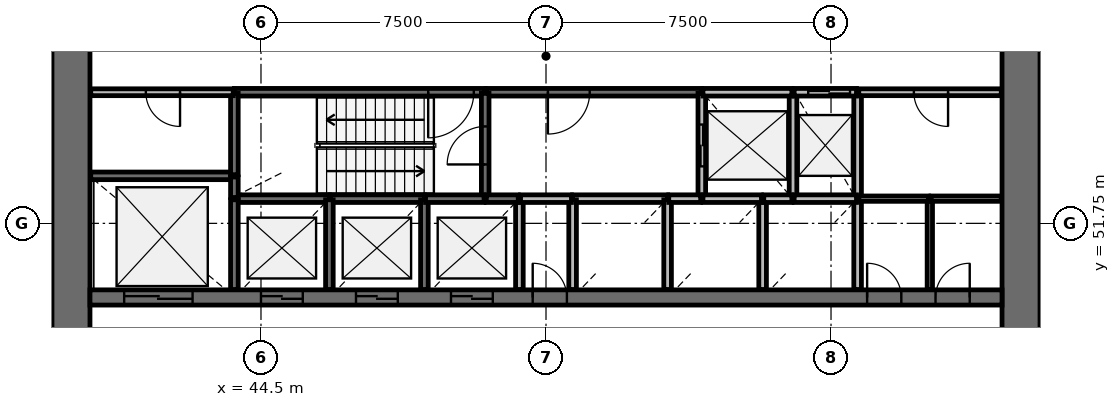
"""IFC4 building model, lengths in metres.
Left out: names, types, materials, properties, quantities, classifications, styles, units other than length and angle.
Written with IfcOpenShell. Run it as: python <this file> out.ifc"""

import sys

from ifc_helpers import new_model, si_unit, direction, frame, frame_2d, origin, place, context, subcontext, project, spatial, rectangle, extrude, source, transform, mapped, element, fill, save


model = new_model("IFC4")
c1 = context("Model", 3, precision=1e-05, world=origin(), true_north=direction((0.0, 1.0)))
c2 = subcontext(c1, "Body", "Model", "MODEL_VIEW")
j1 = project(units=[si_unit("LENGTHUNIT", "METRE"), si_unit("PLANEANGLEUNIT", "RADIAN")], contexts=[c1])
p1 = place(None, origin())
s1 = spatial("IfcSite", under=j1, at=p1, CompositionType="ELEMENT")
p2 = place(p1, origin())
s2 = spatial("IfcBuilding", under=s1, at=p2, CompositionType="ELEMENT")
p3 = place(p2, frame((0.0, 0.0, 62.2)))
s3 = spatial("IfcBuildingStorey", under=s2, at=p3, CompositionType="ELEMENT", Elevation=62.2)
p4 = place(p3, frame((64.5, 38.0, 0.0), z_axis=(0.0, 0.0, 1.0), x_axis=(0.0, 1.0, 0.0)))
e1 = element("IfcWall", 1, at=p4, inside=s3, PredefinedType="SHEAR", context=c2, shape_type="SweptSolid", body=[
    extrude(rectangle(XDim=20.0, YDim=1.0, at=frame_2d((10.0, 0.0))), origin(), (0.0, 0.0, 1.0), 4.4),
])
p5 = place(p4, frame((9.1, 0.0, 0.0)))
e2 = element("IfcOpeningElement", 2, at=p5, cuts=e1, PredefinedType="OPENING", context=c2, shape_type="SweptSolid", body=[
    extrude(rectangle(XDim=1.8, YDim=2.1, at=frame_2d((0.9, 1.05))), frame((0.0, 0.51, 0.0), z_axis=(0.0, -1.0, 0.0), x_axis=(1.0, 0.0, 0.0)), (0.0, 0.0, 1.0), 1.02),
])
p6 = place(p3, frame((39.5, 58.0, 0.0), z_axis=(0.0, 0.0, 1.0), x_axis=(0.0, -1.0, 0.0)))
e3 = element("IfcWall", 3, at=p6, inside=s3, PredefinedType="SHEAR", context=c2, shape_type="SweptSolid", body=[
    extrude(rectangle(XDim=20.0, YDim=1.0, at=frame_2d((10.0, 0.0))), origin(), (0.0, 0.0, 1.0), 4.4),
])
p7 = place(p6, frame((9.1, 0.0, 0.0)))
e4 = element("IfcOpeningElement", 4, at=p7, cuts=e3, PredefinedType="OPENING", context=c2, shape_type="SweptSolid", body=[
    extrude(rectangle(XDim=1.8, YDim=2.1, at=frame_2d((0.9, 1.05))), frame((0.0, 0.51, 0.0), z_axis=(0.0, -1.0, 0.0), x_axis=(1.0, 0.0, 0.0)), (0.0, 0.0, 1.0), 1.02),
])
p8 = place(p3, frame((40.0, 49.8, 0.0), z_axis=(0.0, 0.0, 1.0), x_axis=(1.0, 0.0, 0.0)))
e5 = element("IfcWall", 5, at=p8, inside=s3, PredefinedType="SHEAR", context=c2, shape_type="SweptSolid", body=[
    extrude(rectangle(XDim=24.0, YDim=0.4, at=frame_2d((12.0, 0.0))), origin(), (0.0, 0.0, 1.0), 4.4),
])
p9 = place(p8, frame((4.5, 0.0, 0.0)))
e6 = element("IfcOpeningElement", 6, at=p9, cuts=e5, PredefinedType="OPENING", context=c2, shape_type="SweptSolid", body=[
    extrude(rectangle(XDim=1.1, YDim=2.1, at=frame_2d((0.55, 1.05))), frame((0.0, 0.21, 0.0), z_axis=(0.0, -1.0, 0.0), x_axis=(1.0, 0.0, 0.0)), (0.0, 0.0, 1.0), 0.42),
])
p10 = place(p8, frame((7.0, 0.0, 0.0)))
e7 = element("IfcOpeningElement", 7, at=p10, cuts=e5, PredefinedType="OPENING", context=c2, shape_type="SweptSolid", body=[
    extrude(rectangle(XDim=1.1, YDim=2.1, at=frame_2d((0.55, 1.05))), frame((0.0, 0.21, 0.0), z_axis=(0.0, -1.0, 0.0), x_axis=(1.0, 0.0, 0.0)), (0.0, 0.0, 1.0), 0.42),
])
p11 = place(p8, frame((9.5, 0.0, 0.0)))
e8 = element("IfcOpeningElement", 8, at=p11, cuts=e5, PredefinedType="OPENING", context=c2, shape_type="SweptSolid", body=[
    extrude(rectangle(XDim=1.1, YDim=2.1, at=frame_2d((0.55, 1.05))), frame((0.0, 0.21, 0.0), z_axis=(0.0, -1.0, 0.0), x_axis=(1.0, 0.0, 0.0)), (0.0, 0.0, 1.0), 0.42),
])
p12 = place(p8, frame((0.9, 0.0, 0.0)))
e9 = element("IfcOpeningElement", 9, at=p12, cuts=e5, PredefinedType="OPENING", context=c2, shape_type="SweptSolid", body=[
    extrude(rectangle(XDim=1.8, YDim=2.4, at=frame_2d((0.9, 1.2))), frame((0.0, 0.21, 0.0), z_axis=(0.0, -1.0, 0.0), x_axis=(1.0, 0.0, 0.0)), (0.0, 0.0, 1.0), 0.42),
])
p13 = place(p8, frame((20.45, 0.0, 0.0)))
e10 = element("IfcOpeningElement", 10, at=p13, cuts=e5, PredefinedType="OPENING", context=c2, shape_type="SweptSolid", body=[
    extrude(rectangle(XDim=0.9, YDim=2.1, at=frame_2d((0.45, 1.05))), frame((0.0, 0.21, 0.0), z_axis=(0.0, -1.0, 0.0), x_axis=(1.0, 0.0, 0.0)), (0.0, 0.0, 1.0), 0.42),
])
p14 = place(p8, frame((22.25, 0.0, 0.0)))
e11 = element("IfcOpeningElement", 11, at=p14, cuts=e5, PredefinedType="OPENING", context=c2, shape_type="SweptSolid", body=[
    extrude(rectangle(XDim=0.9, YDim=2.1, at=frame_2d((0.45, 1.05))), frame((0.0, 0.21, 0.0), z_axis=(0.0, -1.0, 0.0), x_axis=(1.0, 0.0, 0.0)), (0.0, 0.0, 1.0), 0.42),
])
p15 = place(p8, frame((11.65, 0.0, 0.0)))
e12 = element("IfcOpeningElement", 12, at=p15, cuts=e5, PredefinedType="OPENING", context=c2, shape_type="SweptSolid", body=[
    extrude(rectangle(XDim=0.9, YDim=2.1, at=frame_2d((0.45, 1.05))), frame((0.0, 0.21, 0.0), z_axis=(0.0, -1.0, 0.0), x_axis=(1.0, 0.0, 0.0)), (0.0, 0.0, 1.0), 0.42),
])
p16 = place(p3, frame((50.4, 55.2, 0.0), z_axis=(0.0, 0.0, 1.0), x_axis=(-1.0, 0.0, 0.0)))
e13 = element("IfcWall", 13, at=p16, inside=s3, PredefinedType="SOLIDWALL", context=c2, shape_type="SweptSolid", body=[
    extrude(rectangle(XDim=6.6, YDim=0.2, at=frame_2d((3.3, 0.0))), origin(), (0.0, 0.0, 1.0), 3.95),
])
p17 = place(p16, frame((0.3, 0.0, 0.0)))
e14 = element("IfcOpeningElement", 14, at=p17, cuts=e13, PredefinedType="OPENING", context=c2, shape_type="SweptSolid", body=[
    extrude(rectangle(XDim=1.2, YDim=2.1, at=frame_2d((0.6, 1.05))), frame((0.0, 0.11, 0.0), z_axis=(0.0, -1.0, 0.0), x_axis=(1.0, 0.0, 0.0)), (0.0, 0.0, 1.0), 0.22),
])
p18 = place(p3, frame((56.1, 55.2, 0.0), z_axis=(0.0, 0.0, 1.0), x_axis=(-1.0, 0.0, 0.0)))
e15 = element("IfcWall", 15, at=p18, inside=s3, PredefinedType="SOLIDWALL", context=c2, shape_type="SweptSolid", body=[
    extrude(rectangle(XDim=5.67, YDim=0.2, at=frame_2d((2.835, 0.0))), origin(), (0.0, 0.0, 1.0), 3.95),
])
p19 = place(p18, frame((2.95, 0.0, 0.0)))
e16 = element("IfcOpeningElement", 16, at=p19, cuts=e15, PredefinedType="OPENING", context=c2, shape_type="SweptSolid", body=[
    extrude(rectangle(XDim=1.1, YDim=2.1, at=frame_2d((0.55, 1.05))), frame((0.0, 0.11, 0.0), z_axis=(0.0, -1.0, 0.0), x_axis=(1.0, 0.0, 0.0)), (0.0, 0.0, 1.0), 0.22),
])
p20 = place(p3, frame((43.8, 53.0, 0.0), z_axis=(0.0, 0.0, 1.0), x_axis=(-1.0, 0.0, 0.0)))
e17 = element("IfcWall", 17, at=p20, inside=s3, PredefinedType="SOLIDWALL", context=c2, shape_type="SweptSolid", body=[
    extrude(rectangle(XDim=3.78, YDim=0.2, at=frame_2d((1.89, 0.0))), origin(), (0.0, 0.0, 1.0), 3.95),
])
p21 = place(p3, frame((50.4, 52.4, 0.0), z_axis=(0.0, 0.0, 1.0), x_axis=(0.0, 1.0, 0.0)))
e18 = element("IfcWall", 18, at=p21, inside=s3, PredefinedType="SOLIDWALL", context=c2, shape_type="SweptSolid", body=[
    extrude(rectangle(XDim=2.77, YDim=0.2, at=frame_2d((1.385, 0.0))), origin(), (0.0, 0.0, 1.0), 3.95),
])
p22 = place(p21, frame((0.9, 0.0, 0.0)))
e19 = element("IfcOpeningElement", 19, at=p22, cuts=e18, PredefinedType="OPENING", context=c2, shape_type="SweptSolid", body=[
    extrude(rectangle(XDim=1.0, YDim=2.1, at=frame_2d((0.5, 1.05))), frame((0.0, 0.11, 0.0), z_axis=(0.0, -1.0, 0.0), x_axis=(1.0, 0.0, 0.0)), (0.0, 0.0, 1.0), 0.22),
])
p23 = place(p3, frame((56.1, 55.17, 0.0), z_axis=(0.0, 0.0, 1.0), x_axis=(0.0, -1.0, 0.0)))
e20 = element("IfcWall", 20, at=p23, inside=s3, PredefinedType="SOLIDWALL", context=c2, shape_type="SweptSolid", body=[
    extrude(rectangle(XDim=2.77, YDim=0.2, at=frame_2d((1.385, 0.0))), origin(), (0.0, 0.0, 1.0), 3.95),
])
p24 = place(p23, frame((0.82, 0.0, 0.0)))
e21 = element("IfcOpeningElement", 21, at=p24, cuts=e20, PredefinedType="OPENING", context=c2, shape_type="SweptSolid", body=[
    extrude(rectangle(XDim=1.1, YDim=2.1, at=frame_2d((0.55, 1.05))), frame((0.0, 0.11, 0.0), z_axis=(0.0, -1.0, 0.0), x_axis=(1.0, 0.0, 0.0)), (0.0, 0.0, 1.0), 0.22),
])
for number, where, z_axis, x_axis in (
    (22, (58.5, 52.4, 0.0), (0.0, 0.0, 1.0), (0.0, 1.0, 0.0)),
    (23, (60.2, 52.4, 0.0), (0.0, 0.0, 1.0), (0.0, 1.0, 0.0)),
):
    element("IfcWall", number, at=place(p3, frame(where, z_axis=z_axis, x_axis=x_axis)), inside=s3, PredefinedType="SOLIDWALL", context=c2, shape_type="SweptSolid", body=[
        extrude(rectangle(XDim=2.8, YDim=0.2, at=frame_2d((1.4, 0.0))), origin(), (0.0, 0.0, 1.0), 3.95),
    ])
p25 = place(p3, frame((46.3, 52.4, 0.0), z_axis=(0.0, 0.0, 1.0), x_axis=(-1.0, 0.0, 0.0)))
e24 = element("IfcWall", 24, at=p25, inside=s3, PredefinedType="SOLIDWALL", context=c2, shape_type="SweptSolid", body=[
    extrude(rectangle(XDim=2.5, YDim=0.2, at=frame_2d((1.25, 0.0))), origin(), (0.0, 0.0, 1.0), 3.95),
])
p26 = place(p3, frame((48.8, 52.4, 0.0), z_axis=(0.0, 0.0, 1.0), x_axis=(-1.0, 0.0, 0.0)))
e25 = element("IfcWall", 25, at=p26, inside=s3, PredefinedType="SOLIDWALL", context=c2, shape_type="SweptSolid", body=[
    extrude(rectangle(XDim=2.47, YDim=0.2, at=frame_2d((1.235, 0.0))), origin(), (0.0, 0.0, 1.0), 3.95),
])
p27 = place(p3, frame((55.2, 52.4, 0.0), z_axis=(0.0, 0.0, 1.0), x_axis=(-1.0, 0.0, 0.0)))
e26 = element("IfcWall", 26, at=p27, inside=s3, PredefinedType="SOLIDWALL", context=c2, shape_type="SweptSolid", body=[
    extrude(rectangle(XDim=2.5, YDim=0.2, at=frame_2d((1.25, 0.0))), origin(), (0.0, 0.0, 1.0), 3.95),
])
p28 = place(p3, frame((58.47, 55.2, 0.0), z_axis=(0.0, 0.0, 1.0), x_axis=(-1.0, 0.0, 0.0)))
e27 = element("IfcWall", 27, at=p28, inside=s3, PredefinedType="SOLIDWALL", context=c2, shape_type="SweptSolid", body=[
    extrude(rectangle(XDim=2.34, YDim=0.2, at=frame_2d((1.17, 0.0))), origin(), (0.0, 0.0, 1.0), 3.95),
])
for number, where, z_axis, x_axis in (
    (28, (43.8, 52.37, 0.0), (0.0, 0.0, 1.0), (0.0, -1.0, 0.0)),
    (29, (46.3, 50.01, 0.0), (0.0, 0.0, 1.0), (0.0, 1.0, 0.0)),
    (30, (48.8, 50.01, 0.0), (0.0, 0.0, 1.0), (0.0, 1.0, 0.0)),
):
    element("IfcWall", number, at=place(p3, frame(where, z_axis=z_axis, x_axis=x_axis)), inside=s3, PredefinedType="SOLIDWALL", context=c2, shape_type="SweptSolid", body=[
        extrude(rectangle(XDim=2.36, YDim=0.2, at=frame_2d((1.18, 0.0))), origin(), (0.0, 0.0, 1.0), 3.95),
    ])
p29 = place(p3, frame((51.3, 50.01, 0.0), z_axis=(0.0, 0.0, 1.0), x_axis=(0.0, 1.0, 0.0)))
e31 = element("IfcWall", 31, at=p29, inside=s3, PredefinedType="SOLIDWALL", context=c2, shape_type="SweptSolid", body=[
    extrude(rectangle(XDim=2.39, YDim=0.2, at=frame_2d((1.195, 0.0))), origin(), (0.0, 0.0, 1.0), 3.95),
])
for number, where, z_axis, x_axis in (
    (32, (52.7, 52.37, 0.0), (0.0, 0.0, 1.0), (0.0, -1.0, 0.0)),
    (33, (55.2, 50.01, 0.0), (0.0, 0.0, 1.0), (0.0, 1.0, 0.0)),
):
    element("IfcWall", number, at=place(p3, frame(where, z_axis=z_axis, x_axis=x_axis)), inside=s3, PredefinedType="SOLIDWALL", context=c2, shape_type="SweptSolid", body=[
        extrude(rectangle(XDim=2.36, YDim=0.2, at=frame_2d((1.18, 0.0))), origin(), (0.0, 0.0, 1.0), 3.95),
    ])
p30 = place(p3, frame((57.7, 50.01, 0.0), z_axis=(0.0, 0.0, 1.0), x_axis=(0.0, 1.0, 0.0)))
e34 = element("IfcWall", 34, at=p30, inside=s3, PredefinedType="SOLIDWALL", context=c2, shape_type="SweptSolid", body=[
    extrude(rectangle(XDim=2.39, YDim=0.2, at=frame_2d((1.195, 0.0))), origin(), (0.0, 0.0, 1.0), 3.95),
])
p31 = place(p3, frame((60.2, 50.01, 0.0), z_axis=(0.0, 0.0, 1.0), x_axis=(0.0, 1.0, 0.0)))
e35 = element("IfcWall", 35, at=p31, inside=s3, PredefinedType="SOLIDWALL", context=c2, shape_type="SweptSolid", body=[
    extrude(rectangle(XDim=2.36, YDim=0.2, at=frame_2d((1.18, 0.0))), origin(), (0.0, 0.0, 1.0), 3.95),
])
p32 = place(p3, frame((43.8, 55.17, 0.0), z_axis=(0.0, 0.0, 1.0), x_axis=(0.0, -1.0, 0.0)))
e36 = element("IfcWall", 36, at=p32, inside=s3, PredefinedType="SOLIDWALL", context=c2, shape_type="SweptSolid", body=[
    extrude(rectangle(XDim=2.14, YDim=0.2, at=frame_2d((1.07, 0.0))), origin(), (0.0, 0.0, 1.0), 3.95),
])
p33 = place(p3, frame((60.17, 52.4, 0.0), z_axis=(0.0, 0.0, 1.0), x_axis=(-1.0, 0.0, 0.0)))
e37 = element("IfcWall", 37, at=p33, inside=s3, PredefinedType="SOLIDWALL", context=c2, shape_type="SweptSolid", body=[
    extrude(rectangle(XDim=1.64, YDim=0.2, at=frame_2d((0.82, 0.0))), origin(), (0.0, 0.0, 1.0), 3.95),
])
p34 = place(p3, frame((60.17, 55.2, 0.0), z_axis=(0.0, 0.0, 1.0), x_axis=(-1.0, 0.0, 0.0)))
e38 = element("IfcWall", 38, at=p34, inside=s3, PredefinedType="SOLIDWALL", context=c2, shape_type="SweptSolid", body=[
    extrude(rectangle(XDim=1.64, YDim=0.2, at=frame_2d((0.82, 0.0))), origin(), (0.0, 0.0, 1.0), 3.95),
])
p35 = place(p34, frame((0.17, 0.0, 0.0)))
e39 = element("IfcOpeningElement", 39, at=p35, cuts=e38, PredefinedType="OPENING", context=c2, shape_type="SweptSolid", body=[
    extrude(rectangle(XDim=1.1, YDim=2.1, at=frame_2d((0.55, 1.05))), frame((0.0, 0.11, 0.0), z_axis=(0.0, -1.0, 0.0), x_axis=(1.0, 0.0, 0.0)), (0.0, 0.0, 1.0), 0.22),
])
for number, where, z_axis, x_axis in (
    (40, (50.37, 52.4, 0.0), (0.0, 0.0, 1.0), (-1.0, 0.0, 0.0)),
    (41, (57.67, 52.4, 0.0), (0.0, 0.0, 1.0), (-1.0, 0.0, 0.0)),
):
    element("IfcWall", number, at=place(p3, frame(where, z_axis=z_axis, x_axis=x_axis)), inside=s3, PredefinedType="SOLIDWALL", context=c2, shape_type="SweptSolid", body=[
        extrude(rectangle(XDim=1.54, YDim=0.2, at=frame_2d((0.77, 0.0))), origin(), (0.0, 0.0, 1.0), 3.95),
    ])
p36 = place(p3, frame((51.33, 52.4, 0.0), z_axis=(0.0, 0.0, 1.0), x_axis=(1.0, 0.0, 0.0)))
e42 = element("IfcWall", 42, at=p36, inside=s3, PredefinedType="SOLIDWALL", context=c2, shape_type="SweptSolid", body=[
    extrude(rectangle(XDim=1.34, YDim=0.2, at=frame_2d((0.67, 0.0))), origin(), (0.0, 0.0, 1.0), 3.95),
])
for number, where, z_axis, x_axis in (
    (43, (51.27, 52.4, 0.0), (0.0, 0.0, 1.0), (-1.0, 0.0, 0.0)),
    (44, (56.07, 52.4, 0.0), (0.0, 0.0, 1.0), (-1.0, 0.0, 0.0)),
):
    element("IfcWall", number, at=place(p3, frame(where, z_axis=z_axis, x_axis=x_axis)), inside=s3, PredefinedType="SOLIDWALL", context=c2, shape_type="SweptSolid", body=[
        extrude(rectangle(XDim=0.84, YDim=0.2, at=frame_2d((0.42, 0.0))), origin(), (0.0, 0.0, 1.0), 3.95),
    ])
p37 = place(p3, frame((58.47, 52.4, 0.0), z_axis=(0.0, 0.0, 1.0), x_axis=(-1.0, 0.0, 0.0)))
e45 = element("IfcWall", 45, at=p37, inside=s3, PredefinedType="SOLIDWALL", context=c2, shape_type="SweptSolid", body=[
    extrude(rectangle(XDim=0.74, YDim=0.2, at=frame_2d((0.37, 0.0))), origin(), (0.0, 0.0, 1.0), 3.95),
])
p38 = place(p3, frame((43.8, 52.43, 0.0), z_axis=(0.0, 0.0, 1.0), x_axis=(0.0, 1.0, 0.0)))
e46 = element("IfcWall", 46, at=p38, inside=s3, PredefinedType="SOLIDWALL", context=c2, shape_type="SweptSolid", body=[
    extrude(rectangle(XDim=0.54, YDim=0.2, at=frame_2d((0.27, 0.0))), origin(), (0.0, 0.0, 1.0), 3.95),
])
p39 = place(p3, frame((43.77, 55.2, 0.0), z_axis=(0.0, 0.0, 1.0), x_axis=(-1.0, 0.0, 0.0)))
e47 = element("IfcWall", 47, at=p39, inside=s3, PredefinedType="PARTITIONING", context=c2, shape_type="SweptSolid", body=[
    extrude(rectangle(XDim=3.75, YDim=0.18, at=frame_2d((1.875, 0.0))), origin(), (0.0, 0.0, 1.0), 3.95),
])
p40 = place(p39, frame((1.4, 0.0, 0.0)))
e48 = element("IfcOpeningElement", 48, at=p40, cuts=e47, PredefinedType="OPENING", context=c2, shape_type="SweptSolid", body=[
    extrude(rectangle(XDim=0.9, YDim=2.1, at=frame_2d((0.45, 1.05))), frame((0.0, 0.1, 0.0), z_axis=(0.0, -1.0, 0.0), x_axis=(1.0, 0.0, 0.0)), (0.0, 0.0, 1.0), 0.2),
])
p41 = place(p3, frame((63.98, 55.2, 0.0), z_axis=(0.0, 0.0, 1.0), x_axis=(-1.0, 0.0, 0.0)))
e49 = element("IfcWall", 49, at=p41, inside=s3, PredefinedType="PARTITIONING", context=c2, shape_type="SweptSolid", body=[
    extrude(rectangle(XDim=3.75, YDim=0.18, at=frame_2d((1.875, 0.0))), origin(), (0.0, 0.0, 1.0), 3.95),
])
p42 = place(p41, frame((1.4, 0.0, 0.0)))
e50 = element("IfcOpeningElement", 50, at=p42, cuts=e49, PredefinedType="OPENING", context=c2, shape_type="SweptSolid", body=[
    extrude(rectangle(XDim=0.9, YDim=2.1, at=frame_2d((0.45, 1.05))), frame((0.0, 0.1, 0.0), z_axis=(0.0, -1.0, 0.0), x_axis=(1.0, 0.0, 0.0)), (0.0, 0.0, 1.0), 0.2),
])
p43 = place(p3, frame((62.1, 50.01, 0.0), z_axis=(0.0, 0.0, 1.0), x_axis=(0.0, 1.0, 0.0)))
e51 = element("IfcWall", 51, at=p43, inside=s3, PredefinedType="PARTITIONING", context=c2, shape_type="SweptSolid", body=[
    extrude(rectangle(XDim=2.39, YDim=0.14, at=frame_2d((1.195, 0.0))), origin(), (0.0, 0.0, 1.0), 3.05),
])
p44 = place(p3, frame((62.07, 52.4, 0.0), z_axis=(0.0, 0.0, 1.0), x_axis=(-1.0, 0.0, 0.0)))
e52 = element("IfcWall", 52, at=p44, inside=s3, PredefinedType="PARTITIONING", context=c2, shape_type="SweptSolid", body=[
    extrude(rectangle(XDim=1.84, YDim=0.14, at=frame_2d((0.92, 0.0))), origin(), (0.0, 0.0, 1.0), 3.05),
])
p45 = place(p3, frame((63.98, 52.4, 0.0), z_axis=(0.0, 0.0, 1.0), x_axis=(-1.0, 0.0, 0.0)))
e53 = element("IfcWall", 53, at=p45, inside=s3, PredefinedType="PARTITIONING", context=c2, shape_type="SweptSolid", body=[
    extrude(rectangle(XDim=1.85, YDim=0.14, at=frame_2d((0.925, 0.0))), origin(), (0.0, 0.0, 1.0), 3.05),
])
m1 = source(origin(), c2, "Body", "SweptSolid", [
    extrude(rectangle(XDim=1.1, YDim=2.1, at=frame_2d((0.55, 1.05))), frame((0.0, 0.025, 0.0), z_axis=(0.0, -1.0, 0.0), x_axis=(1.0, 0.0, 0.0)), (0.0, 0.0, 1.0), 0.05),
])
p46 = place(p9, origin())
e54 = element("IfcDoor", 54, at=p46, inside=s3, OperationType="DOUBLE_DOOR_SLIDING", PredefinedType="USERDEFINED", context=c2, shape_type="MappedRepresentation", body=[
    mapped(m1, transform((0.0, 0.0, 0.0), scale=1.0)),
])
fill(e6, e54)
p47 = place(p10, origin())
e55 = element("IfcDoor", 55, at=p47, inside=s3, OperationType="DOUBLE_DOOR_SLIDING", PredefinedType="USERDEFINED", context=c2, shape_type="MappedRepresentation", body=[
    mapped(m1, transform((0.0, 0.0, 0.0), scale=1.0)),
])
fill(e7, e55)
p48 = place(p11, origin())
e56 = element("IfcDoor", 56, at=p48, inside=s3, OperationType="DOUBLE_DOOR_SLIDING", PredefinedType="USERDEFINED", context=c2, shape_type="MappedRepresentation", body=[
    mapped(m1, transform((0.0, 0.0, 0.0), scale=1.0)),
])
fill(e8, e56)
p49 = place(p24, origin())
e57 = element("IfcDoor", 57, at=p49, inside=s3, OperationType="DOUBLE_DOOR_SLIDING", PredefinedType="USERDEFINED", context=c2, shape_type="MappedRepresentation", body=[
    mapped(m1, transform((0.0, 0.0, 0.0), scale=1.0)),
])
fill(e21, e57)
p50 = place(p35, origin())
e58 = element("IfcDoor", 58, at=p50, inside=s3, OperationType="DOUBLE_DOOR_SLIDING", PredefinedType="USERDEFINED", context=c2, shape_type="MappedRepresentation", body=[
    mapped(m1, transform((0.0, 0.0, 0.0), scale=1.0)),
])
fill(e39, e58)
m2 = source(origin(), c2, "Body", "SweptSolid", [
    extrude(rectangle(XDim=1.8, YDim=2.4, at=frame_2d((0.9, 1.2))), frame((0.0, 0.025, 0.0), z_axis=(0.0, -1.0, 0.0), x_axis=(1.0, 0.0, 0.0)), (0.0, 0.0, 1.0), 0.05),
])
p51 = place(p12, origin())
e59 = element("IfcDoor", 59, at=p51, inside=s3, OperationType="DOUBLE_DOOR_SLIDING", PredefinedType="USERDEFINED", context=c2, shape_type="MappedRepresentation", body=[
    mapped(m2, transform((0.0, 0.0, 0.0), scale=1.0)),
])
fill(e9, e59)
m3 = source(origin(), c2, "Body", "SweptSolid", [
    extrude(rectangle(XDim=1.2, YDim=2.1, at=frame_2d((0.6, 1.05))), frame((0.0, 0.025, 0.0), z_axis=(0.0, -1.0, 0.0), x_axis=(1.0, 0.0, 0.0)), (0.0, 0.0, 1.0), 0.05),
])
p52 = place(p17, origin())
e60 = element("IfcDoor", 60, at=p52, inside=s3, OperationType="SINGLE_SWING_RIGHT", PredefinedType="DOOR", context=c2, shape_type="MappedRepresentation", body=[
    mapped(m3, transform((0.0, 0.0, 0.0), scale=1.0)),
])
fill(e14, e60)
m4 = source(origin(), c2, "Body", "SweptSolid", [
    extrude(rectangle(XDim=1.0, YDim=2.1, at=frame_2d((0.5, 1.05))), frame((0.0, 0.025, 0.0), z_axis=(0.0, -1.0, 0.0), x_axis=(1.0, 0.0, 0.0)), (0.0, 0.0, 1.0), 0.05),
])
p53 = place(p22, origin())
e61 = element("IfcDoor", 61, at=p53, inside=s3, OperationType="SINGLE_SWING_LEFT", PredefinedType="DOOR", context=c2, shape_type="MappedRepresentation", body=[
    mapped(m4, transform((0.0, 0.0, 0.0), scale=1.0)),
])
fill(e19, e61)
m5 = source(origin(), c2, "Body", "SweptSolid", [
    extrude(rectangle(XDim=1.1, YDim=2.1, at=frame_2d((0.55, 1.05))), frame((0.0, 0.025, 0.0), z_axis=(0.0, -1.0, 0.0), x_axis=(1.0, 0.0, 0.0)), (0.0, 0.0, 1.0), 0.05),
])
p54 = place(p19, origin())
e62 = element("IfcDoor", 62, at=p54, inside=s3, OperationType="SINGLE_SWING_RIGHT", PredefinedType="DOOR", context=c2, shape_type="MappedRepresentation", body=[
    mapped(m5, transform((0.0, 0.0, 0.0), scale=1.0)),
])
fill(e16, e62)
m6 = source(origin(), c2, "Body", "SweptSolid", [
    extrude(rectangle(XDim=0.9, YDim=2.1, at=frame_2d((0.45, 1.05))), frame((0.0, 0.025, 0.0), z_axis=(0.0, -1.0, 0.0), x_axis=(1.0, 0.0, 0.0)), (0.0, 0.0, 1.0), 0.05),
])
p55 = place(p40, origin())
e63 = element("IfcDoor", 63, at=p55, inside=s3, OperationType="SINGLE_SWING_LEFT", PredefinedType="DOOR", context=c2, shape_type="MappedRepresentation", body=[
    mapped(m6, transform((0.0, 0.0, 0.0), scale=1.0)),
])
fill(e48, e63)
p56 = place(p13, origin())
e64 = element("IfcDoor", 64, at=p56, inside=s3, OperationType="SINGLE_SWING_LEFT", PredefinedType="DOOR", context=c2, shape_type="MappedRepresentation", body=[
    mapped(m6, transform((0.0, 0.0, 0.0), scale=1.0)),
])
fill(e10, e64)
p57 = place(p14, origin())
e65 = element("IfcDoor", 65, at=p57, inside=s3, OperationType="SINGLE_SWING_RIGHT", PredefinedType="DOOR", context=c2, shape_type="MappedRepresentation", body=[
    mapped(m6, transform((0.0, 0.0, 0.0), scale=1.0)),
])
fill(e11, e65)
p58 = place(p42, origin())
e66 = element("IfcDoor", 66, at=p58, inside=s3, OperationType="SINGLE_SWING_LEFT", PredefinedType="DOOR", context=c2, shape_type="MappedRepresentation", body=[
    mapped(m6, transform((0.0, 0.0, 0.0), scale=1.0)),
])
fill(e50, e66)
p59 = place(p15, origin())
e67 = element("IfcDoor", 67, at=p59, inside=s3, OperationType="SINGLE_SWING_LEFT", PredefinedType="DOOR", context=c2, shape_type="MappedRepresentation", body=[
    mapped(m6, transform((0.0, 0.0, 0.0), scale=1.0)),
])
fill(e12, e67)
save(model, sys.argv[1])
